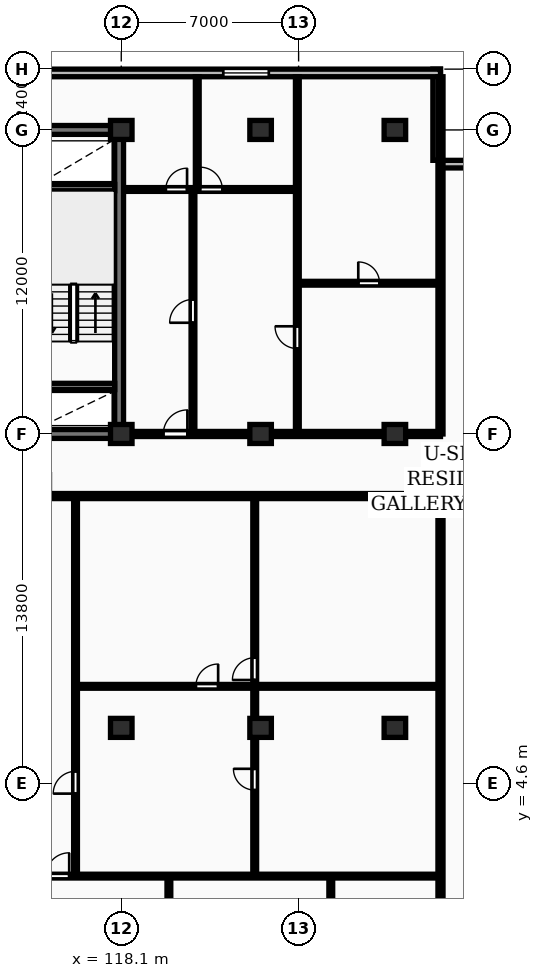
"""IFC4 building model, lengths in metres.
Left out: names, types, materials, properties, quantities, classifications, styles, units other than length and angle.
Written with IfcOpenShell. Run it as: python <this file> out.ifc"""

import sys

from ifc_helpers import new_model, si_unit, direction, frame, frame_2d, origin, origin_2d, place, context, subcontext, project, spatial, rectangle, extrude, element, fill, save


model = new_model("IFC4")
c1 = context("Model", 3, precision=1e-05, world=origin(), true_north=direction((0.0, 1.0)))
c2 = subcontext(c1, "Body", "Model", "MODEL_VIEW")
j1 = project(units=[si_unit("LENGTHUNIT", "METRE"), si_unit("PLANEANGLEUNIT", "RADIAN")], contexts=[c1])
p1 = place(None, origin())
s1 = spatial("IfcSite", under=j1, at=p1, CompositionType="ELEMENT")
p2 = place(p1, origin())
s2 = spatial("IfcBuilding", under=s1, at=p2, CompositionType="ELEMENT")
p3 = place(p2, frame((0.0, 0.0, 100.3)))
s3 = spatial("IfcBuildingStorey", under=s2, at=p3, CompositionType="ELEMENT", Elevation=100.3)
for number, where, z_axis, x_axis in (
    (1, (118.1, 6.8, 0.0), (0.0, 0.0, 1.0), (1.0, 0.0, 0.0)),
    (2, (118.1, 18.4, 0.0), (0.0, 0.0, 1.0), (1.0, 0.0, 0.0)),
    (3, (118.1, 30.4, 0.0), (0.0, 0.0, 1.0), (1.0, 0.0, 0.0)),
    (4, (123.6, 6.8, 0.0), (0.0, 0.0, 1.0), (1.0, 0.0, 0.0)),
    (5, (123.6, 18.4, 0.0), (0.0, 0.0, 1.0), (1.0, 0.0, 0.0)),
    (6, (123.6, 30.4, 0.0), (0.0, 0.0, 1.0), (1.0, 0.0, 0.0)),
    (7, (128.9, 6.8, 0.0), (0.0, 0.0, 1.0), (1.0, 0.0, 0.0)),
    (8, (128.9, 18.4, 0.0), (0.0, 0.0, 1.0), (1.0, 0.0, 0.0)),
    (9, (128.9, 30.4, 0.0), (0.0, 0.0, 1.0), (1.0, 0.0, 0.0)),
):
    element("IfcColumn", number, at=place(p3, frame(where, z_axis=z_axis, x_axis=x_axis)), inside=s3, PredefinedType="COLUMN", context=c2, shape_type="SweptSolid", body=[
        extrude(rectangle(XDim=0.85, YDim=0.75, at=origin_2d()), origin(), (0.0, 0.0, 1.0), 3.25),
    ])
for number, where, z_axis, x_axis in (
    (10, (134.3, 29.05, 0.0), (0.0, 0.0, 1.0), (-1.0, 0.0, 0.0)),
    (11, (130.55, 29.2, 0.0), (0.0, 0.0, 1.0), (0.0, 1.0, 0.0)),
):
    element("IfcWall", number, at=place(p3, frame(where, z_axis=z_axis, x_axis=x_axis)), inside=s3, PredefinedType="STANDARD", context=c2, shape_type="SweptSolid", body=[
        extrude(rectangle(XDim=3.6, YDim=0.3, at=frame_2d((1.8, 0.0))), origin(), (0.0, 0.0, 1.0), 2.97),
    ])
p4 = place(p3, frame((130.7, 32.65, 0.0), z_axis=(0.0, 0.0, 1.0), x_axis=(-1.0, 0.0, 0.0)))
e12 = element("IfcWall", 12, at=p4, inside=s3, PredefinedType="STANDARD", context=c2, shape_type="SweptSolid", body=[
    extrude(rectangle(XDim=58.0, YDim=0.3, at=frame_2d((29.0, 0.0))), origin(), (0.0, 0.0, 1.0), 2.97),
])
p5 = place(p4, frame((50.125, 0.0, 0.85)))
e13 = element("IfcOpeningElement", 13, at=p5, cuts=e12, PredefinedType="OPENING", context=c2, shape_type="SweptSolid", body=[
    extrude(rectangle(XDim=1.8, YDim=1.8, at=frame_2d((0.9, 0.9))), frame((0.0, 0.16, 0.0), z_axis=(0.0, -1.0, 0.0), x_axis=(1.0, 0.0, 0.0)), (0.0, 0.0, 1.0), 0.32),
])
p6 = place(p4, frame((6.775, 0.0, 0.85)))
e14 = element("IfcOpeningElement", 14, at=p6, cuts=e12, PredefinedType="OPENING", context=c2, shape_type="SweptSolid", body=[
    extrude(rectangle(XDim=1.8, YDim=1.8, at=frame_2d((0.9, 0.9))), frame((0.0, 0.16, 0.0), z_axis=(0.0, -1.0, 0.0), x_axis=(1.0, 0.0, 0.0)), (0.0, 0.0, 1.0), 0.32),
])
p7 = place(p3, frame((81.925, 30.4, 0.0), z_axis=(0.0, 0.0, 1.0), x_axis=(1.0, 0.0, 0.0)))
e15 = element("IfcWall", 15, at=p7, inside=s3, PredefinedType="SHEAR", context=c2, shape_type="SweptSolid", body=[
    extrude(rectangle(XDim=36.265, YDim=0.35, at=frame_2d((18.132, 0.0))), origin(), (0.0, 0.0, 1.0), 3.25),
])
p8 = place(p3, frame((118.015, 18.575, 0.0), z_axis=(0.0, 0.0, 1.0), x_axis=(0.0, 1.0, 0.0)))
e16 = element("IfcWall", 16, at=p8, inside=s3, PredefinedType="SHEAR", context=c2, shape_type="SweptSolid", body=[
    extrude(rectangle(XDim=11.65, YDim=0.35, at=frame_2d((5.825, 0.0))), origin(), (0.0, 0.0, 1.0), 3.25),
])
p9 = place(p3, frame((81.925, 18.4, 0.0), z_axis=(0.0, 0.0, 1.0), x_axis=(1.0, 0.0, 0.0)))
e17 = element("IfcWall", 17, at=p9, inside=s3, PredefinedType="SHEAR", context=c2, shape_type="SweptSolid", body=[
    extrude(rectangle(XDim=36.265, YDim=0.35, at=frame_2d((18.132, 0.0))), origin(), (0.0, 0.0, 1.0), 3.25),
])
p10 = place(p9, frame((5.675, 0.0, 0.0)))
e18 = element("IfcOpeningElement", 18, at=p10, cuts=e17, PredefinedType="OPENING", context=c2, shape_type="SweptSolid", body=[
    extrude(rectangle(XDim=1.0, YDim=2.15, at=frame_2d((0.5, 1.075))), frame((0.0, 0.185, 0.0), z_axis=(0.0, -1.0, 0.0), x_axis=(1.0, 0.0, 0.0)), (0.0, 0.0, 1.0), 0.37),
])
p11 = place(p9, frame((21.925, 0.0, 0.0)))
e19 = element("IfcOpeningElement", 19, at=p11, cuts=e17, PredefinedType="OPENING", context=c2, shape_type="SweptSolid", body=[
    extrude(rectangle(XDim=1.5, YDim=2.2, at=frame_2d((0.75, 1.1))), frame((0.0, 0.185, 0.0), z_axis=(0.0, -1.0, 0.0), x_axis=(1.0, 0.0, 0.0)), (0.0, 0.0, 1.0), 0.37),
])
p12 = place(p9, frame((29.875, 0.0, 0.0)))
e20 = element("IfcOpeningElement", 20, at=p12, cuts=e17, PredefinedType="OPENING", context=c2, shape_type="SweptSolid", body=[
    extrude(rectangle(XDim=1.0, YDim=2.15, at=frame_2d((0.5, 1.075))), frame((0.0, 0.185, 0.0), z_axis=(0.0, -1.0, 0.0), x_axis=(1.0, 0.0, 0.0)), (0.0, 0.0, 1.0), 0.37),
])
for number, where, z_axis, x_axis in (
    (21, (114.6, 20.275, 0.0), (0.0, 0.0, 1.0), (1.0, 0.0, 0.0)),
    (22, (114.6, 28.125, 0.0), (0.0, 0.0, 1.0), (1.0, 0.0, 0.0)),
):
    element("IfcWall", number, at=place(p3, frame(where, z_axis=z_axis, x_axis=x_axis)), inside=s3, PredefinedType="SHEAR", context=c2, shape_type="SweptSolid", body=[
        extrude(rectangle(XDim=3.24, YDim=0.25, at=frame_2d((1.62, 0.0))), origin(), (0.0, 0.0, 1.0), 3.25),
    ])
p13 = place(p3, frame((130.7, 18.4, 0.0), z_axis=(0.0, 0.0, 1.0), x_axis=(0.0, 1.0, 0.0)))
e23 = element("IfcWall", 23, at=p13, inside=s3, PredefinedType="PARTITIONING", context=c2, shape_type="SweptSolid", body=[
    extrude(rectangle(XDim=14.1, YDim=0.2, at=frame_2d((7.05, 0.0))), origin(), (0.0, 0.0, 1.0), 2.97),
])
p14 = place(p3, frame((125.05, 24.35, 0.0), z_axis=(0.0, 0.0, 1.0), x_axis=(1.0, 0.0, 0.0)))
e24 = element("IfcWall", 24, at=p14, inside=s3, PredefinedType="PARTITIONING", context=c2, shape_type="SweptSolid", body=[
    extrude(rectangle(XDim=5.65, YDim=0.15, at=frame_2d((2.825, 0.0))), origin(), (0.0, 0.0, 1.0), 2.97),
])
p15 = place(p14, frame((2.405, 0.0, 0.0)))
e25 = element("IfcOpeningElement", 25, at=p15, cuts=e24, PredefinedType="OPENING", context=c2, shape_type="SweptSolid", body=[
    extrude(rectangle(XDim=0.84, YDim=2.04, at=frame_2d((0.42, 1.02))), frame((0.0, 0.085, 0.0), z_axis=(0.0, -1.0, 0.0), x_axis=(1.0, 0.0, 0.0)), (0.0, 0.0, 1.0), 0.17),
])
p16 = place(p3, frame((125.05, 18.45, 0.0), z_axis=(0.0, 0.0, 1.0), x_axis=(0.0, 1.0, 0.0)))
e26 = element("IfcWall", 26, at=p16, inside=s3, PredefinedType="PARTITIONING", context=c2, shape_type="SweptSolid", body=[
    extrude(rectangle(XDim=14.05, YDim=0.15, at=frame_2d((7.025, 0.0))), origin(), (0.0, 0.0, 1.0), 2.97),
])
p17 = place(p16, frame((3.32, 0.0, 0.0)))
e27 = element("IfcOpeningElement", 27, at=p17, cuts=e26, PredefinedType="OPENING", context=c2, shape_type="SweptSolid", body=[
    extrude(rectangle(XDim=0.88, YDim=2.06, at=frame_2d((0.44, 1.03))), frame((0.0, 0.085, 0.0), z_axis=(0.0, -1.0, 0.0), x_axis=(1.0, 0.0, 0.0)), (0.0, 0.0, 1.0), 0.17),
])
p18 = place(p3, frame((120.93, 18.45, 0.0), z_axis=(0.0, 0.0, 1.0), x_axis=(0.0, 1.0, 0.0)))
e28 = element("IfcWall", 28, at=p18, inside=s3, PredefinedType="PARTITIONING", context=c2, shape_type="SweptSolid", body=[
    extrude(rectangle(XDim=9.6, YDim=0.15, at=frame_2d((4.8, 0.0))), origin(), (0.0, 0.0, 1.0), 2.97),
])
p19 = place(p18, frame((4.34, 0.0, 0.0)))
e29 = element("IfcOpeningElement", 29, at=p19, cuts=e28, PredefinedType="OPENING", context=c2, shape_type="SweptSolid", body=[
    extrude(rectangle(XDim=0.92, YDim=2.08, at=frame_2d((0.46, 1.04))), frame((0.0, 0.085, 0.0), z_axis=(0.0, -1.0, 0.0), x_axis=(1.0, 0.0, 0.0)), (0.0, 0.0, 1.0), 0.17),
])
p20 = place(p3, frame((121.1, 28.05, 0.0), z_axis=(0.0, 0.0, 1.0), x_axis=(0.0, 1.0, 0.0)))
e30 = element("IfcWall", 30, at=p20, inside=s3, PredefinedType="PARTITIONING", context=c2, shape_type="SweptSolid", body=[
    extrude(rectangle(XDim=4.45, YDim=0.15, at=frame_2d((2.225, 0.0))), origin(), (0.0, 0.0, 1.0), 2.97),
])
p21 = place(p3, frame((118.27, 28.05, 0.0), z_axis=(0.0, 0.0, 1.0), x_axis=(1.0, 0.0, 0.0)))
e31 = element("IfcWall", 31, at=p21, inside=s3, PredefinedType="PARTITIONING", context=c2, shape_type="SweptSolid", body=[
    extrude(rectangle(XDim=6.76, YDim=0.15, at=frame_2d((3.38, 0.0))), origin(), (0.0, 0.0, 1.0), 2.97),
])
p22 = place(p21, frame((1.587, 0.0, 0.0)))
e32 = element("IfcOpeningElement", 32, at=p22, cuts=e31, PredefinedType="OPENING", context=c2, shape_type="SweptSolid", body=[
    extrude(rectangle(XDim=0.84, YDim=2.04, at=frame_2d((0.42, 1.02))), frame((0.0, 0.085, 0.0), z_axis=(0.0, -1.0, 0.0), x_axis=(1.0, 0.0, 0.0)), (0.0, 0.0, 1.0), 0.17),
])
p23 = place(p21, frame((2.94, 0.0, 0.0)))
e33 = element("IfcOpeningElement", 33, at=p23, cuts=e31, PredefinedType="OPENING", context=c2, shape_type="SweptSolid", body=[
    extrude(rectangle(XDim=0.88, YDim=2.06, at=frame_2d((0.44, 1.03))), frame((0.0, 0.085, 0.0), z_axis=(0.0, -1.0, 0.0), x_axis=(1.0, 0.0, 0.0)), (0.0, 0.0, 1.0), 0.17),
])
p24 = place(p3, frame((118.25, 18.4, 0.0), z_axis=(0.0, 0.0, 1.0), x_axis=(1.0, 0.0, 0.0)))
e34 = element("IfcWall", 34, at=p24, inside=s3, PredefinedType="PARTITIONING", context=c2, shape_type="SweptSolid", body=[
    extrude(rectangle(XDim=12.45, YDim=0.2, at=frame_2d((6.225, 0.0))), origin(), (0.0, 0.0, 1.0), 2.358),
])
p25 = place(p24, frame((1.51, 0.0, 0.0)))
e35 = element("IfcOpeningElement", 35, at=p25, cuts=e34, PredefinedType="OPENING", context=c2, shape_type="SweptSolid", body=[
    extrude(rectangle(XDim=0.95, YDim=2.15, at=frame_2d((0.475, 1.075))), frame((0.0, 0.11, 0.0), z_axis=(0.0, -1.0, 0.0), x_axis=(1.0, 0.0, 0.0)), (0.0, 0.0, 1.0), 0.22),
])
p26 = place(p3, frame((130.7, -8.7, 0.0), z_axis=(0.0, 0.0, 1.0), x_axis=(0.0, 1.0, 0.0)))
e36 = element("IfcWall", 36, at=p26, inside=s3, PredefinedType="PARTITIONING", context=c2, shape_type="SweptSolid", body=[
    extrude(rectangle(XDim=24.57, YDim=0.2, at=frame_2d((12.285, 0.0))), origin(), (0.0, 0.0, 1.0), 2.97),
])
p27 = place(p3, frame((123.367, 0.99, 0.0), z_axis=(0.0, 0.0, 1.0), x_axis=(0.0, 1.0, 0.0)))
e37 = element("IfcWall", 37, at=p27, inside=s3, PredefinedType="PARTITIONING", context=c2, shape_type="SweptSolid", body=[
    extrude(rectangle(XDim=14.9, YDim=0.15, at=frame_2d((7.45, 0.0))), origin(), (0.0, 0.0, 1.0), 2.2),
])
p28 = place(p27, frame((3.355, 0.0, 0.0)))
e38 = element("IfcOpeningElement", 38, at=p28, cuts=e37, PredefinedType="OPENING", context=c2, shape_type="SweptSolid", body=[
    extrude(rectangle(XDim=0.84, YDim=2.04, at=frame_2d((0.42, 1.02))), frame((0.0, 0.085, 0.0), z_axis=(0.0, -1.0, 0.0), x_axis=(1.0, 0.0, 0.0)), (0.0, 0.0, 1.0), 0.17),
])
p29 = place(p27, frame((7.7, 0.0, 0.0)))
e39 = element("IfcOpeningElement", 39, at=p29, cuts=e37, PredefinedType="OPENING", context=c2, shape_type="SweptSolid", body=[
    extrude(rectangle(XDim=0.88, YDim=2.06, at=frame_2d((0.44, 1.03))), frame((0.0, 0.085, 0.0), z_axis=(0.0, -1.0, 0.0), x_axis=(1.0, 0.0, 0.0)), (0.0, 0.0, 1.0), 0.17),
])
p30 = place(p3, frame((116.355, 8.44, 0.0), z_axis=(0.0, 0.0, 1.0), x_axis=(1.0, 0.0, 0.0)))
e40 = element("IfcWall", 40, at=p30, inside=s3, PredefinedType="PARTITIONING", context=c2, shape_type="SweptSolid", body=[
    extrude(rectangle(XDim=14.265, YDim=0.15, at=frame_2d((7.133, 0.0))), origin(), (0.0, 0.0, 1.0), 2.97),
])
p31 = place(p30, frame((4.689, 0.0, 0.0)))
e41 = element("IfcOpeningElement", 41, at=p31, cuts=e40, PredefinedType="OPENING", context=c2, shape_type="SweptSolid", body=[
    extrude(rectangle(XDim=0.88, YDim=2.06, at=frame_2d((0.44, 1.03))), frame((0.0, 0.085, 0.0), z_axis=(0.0, -1.0, 0.0), x_axis=(1.0, 0.0, 0.0)), (0.0, 0.0, 1.0), 0.17),
])
p32 = place(p3, frame((116.295, 0.99, 0.0), z_axis=(0.0, 0.0, 1.0), x_axis=(0.0, 1.0, 0.0)))
e42 = element("IfcWall", 42, at=p32, inside=s3, PredefinedType="PARTITIONING", context=c2, shape_type="SweptSolid", body=[
    extrude(rectangle(XDim=14.9, YDim=0.15, at=frame_2d((7.45, 0.0))), origin(), (0.0, 0.0, 1.0), 2.97),
])
p33 = place(p32, frame((3.216, 0.0, 0.0)))
e43 = element("IfcOpeningElement", 43, at=p33, cuts=e42, PredefinedType="OPENING", context=c2, shape_type="SweptSolid", body=[
    extrude(rectangle(XDim=0.88, YDim=2.06, at=frame_2d((0.44, 1.03))), frame((0.0, 0.085, 0.0), z_axis=(0.0, -1.0, 0.0), x_axis=(1.0, 0.0, 0.0)), (0.0, 0.0, 1.0), 0.17),
])
p34 = place(p3, frame((119.98, -8.7, 0.0), z_axis=(0.0, 0.0, 1.0), x_axis=(0.0, 1.0, 0.0)))
e44 = element("IfcWall", 44, at=p34, inside=s3, PredefinedType="PARTITIONING", context=c2, shape_type="SweptSolid", body=[
    extrude(rectangle(XDim=9.61, YDim=0.15, at=frame_2d((4.805, 0.0))), origin(), (0.0, 0.0, 1.0), 2.97),
])
p35 = place(p34, frame((5.81, 0.0, 0.0)))
e45 = element("IfcOpeningElement", 45, at=p35, cuts=e44, PredefinedType="OPENING", context=c2, shape_type="SweptSolid", body=[
    extrude(rectangle(XDim=0.92, YDim=2.08, at=frame_2d((0.46, 1.04))), frame((0.0, 0.085, 0.0), z_axis=(0.0, -1.0, 0.0), x_axis=(1.0, 0.0, 0.0)), (0.0, 0.0, 1.0), 0.17),
])
p36 = place(p3, frame((126.37, -1.67, 0.0), z_axis=(0.0, 0.0, 1.0), x_axis=(0.0, 1.0, 0.0)))
e46 = element("IfcWall", 46, at=p36, inside=s3, PredefinedType="PARTITIONING", context=c2, shape_type="SweptSolid", body=[
    extrude(rectangle(XDim=2.58, YDim=0.15, at=frame_2d((1.29, 0.0))), origin(), (0.0, 0.0, 1.0), 2.97),
])
p37 = place(p3, frame((112.405, 0.95, 0.0), z_axis=(0.0, 0.0, 1.0), x_axis=(1.0, 0.0, 0.0)))
e47 = element("IfcWall", 47, at=p37, inside=s3, PredefinedType="PARTITIONING", context=c2, shape_type="SweptSolid", body=[
    extrude(rectangle(XDim=18.215, YDim=0.15, at=frame_2d((9.107, 0.0))), origin(), (0.0, 0.0, 1.0), 2.97),
])
p38 = place(p37, frame((2.72, 0.0, 0.0)))
e48 = element("IfcOpeningElement", 48, at=p38, cuts=e47, PredefinedType="OPENING", context=c2, shape_type="SweptSolid", body=[
    extrude(rectangle(XDim=0.92, YDim=2.08, at=frame_2d((0.46, 1.04))), frame((0.0, 0.085, 0.0), z_axis=(0.0, -1.0, 0.0), x_axis=(1.0, 0.0, 0.0)), (0.0, 0.0, 1.0), 0.17),
])
p39 = place(p3, frame((72.7, 15.95, 0.0), z_axis=(0.0, 0.0, 1.0), x_axis=(1.0, 0.0, 0.0)))
e49 = element("IfcWall", 49, at=p39, inside=s3, PredefinedType="PARTITIONING", context=c2, shape_type="SweptSolid", body=[
    extrude(rectangle(XDim=58.0, YDim=0.2, at=frame_2d((29.0, 0.0))), origin(), (0.0, 0.0, 1.0), 2.97),
])
p40 = place(p39, frame((6.539, 0.0, 0.0)))
e50 = element("IfcOpeningElement", 50, at=p40, cuts=e49, PredefinedType="OPENING", context=c2, shape_type="SweptSolid", body=[
    extrude(rectangle(XDim=1.22, YDim=2.18, at=frame_2d((0.61, 1.09))), frame((0.0, 0.11, 0.0), z_axis=(0.0, -1.0, 0.0), x_axis=(1.0, 0.0, 0.0)), (0.0, 0.0, 1.0), 0.22),
])
p41 = place(p39, frame((20.795, 0.0, 0.0)))
e51 = element("IfcOpeningElement", 51, at=p41, cuts=e49, PredefinedType="OPENING", context=c2, shape_type="SweptSolid", body=[
    extrude(rectangle(XDim=0.95, YDim=2.15, at=frame_2d((0.475, 1.075))), frame((0.0, 0.11, 0.0), z_axis=(0.0, -1.0, 0.0), x_axis=(1.0, 0.0, 0.0)), (0.0, 0.0, 1.0), 0.22),
])
p42 = place(p39, frame((30.92, 0.0, 0.0)))
e52 = element("IfcOpeningElement", 52, at=p42, cuts=e49, PredefinedType="OPENING", context=c2, shape_type="SweptSolid", body=[
    extrude(rectangle(XDim=0.95, YDim=2.15, at=frame_2d((0.475, 1.075))), frame((0.0, 0.11, 0.0), z_axis=(0.0, -1.0, 0.0), x_axis=(1.0, 0.0, 0.0)), (0.0, 0.0, 1.0), 0.22),
])
p43 = place(p39, frame((41.67, 0.0, 0.0)))
e53 = element("IfcOpeningElement", 53, at=p43, cuts=e49, PredefinedType="OPENING", context=c2, shape_type="SweptSolid", body=[
    extrude(rectangle(XDim=0.95, YDim=2.15, at=frame_2d((0.475, 1.075))), frame((0.0, 0.11, 0.0), z_axis=(0.0, -1.0, 0.0), x_axis=(1.0, 0.0, 0.0)), (0.0, 0.0, 1.0), 0.22),
])
p44 = place(p6, origin())
e54 = element("IfcWindow", 54, at=p44, inside=s3, PartitioningType="SINGLE_PANEL", PredefinedType="WINDOW", context=c2, shape_type="SweptSolid", body=[
    extrude(rectangle(XDim=1.8, YDim=1.8, at=frame_2d((0.9, 0.9))), frame((0.0, 0.03, 0.0), z_axis=(0.0, -1.0, 0.0), x_axis=(1.0, 0.0, 0.0)), (0.0, 0.0, 1.0), 0.06),
])
fill(e14, e54)
p45 = place(p15, origin())
e55 = element("IfcDoor", 55, at=p45, inside=s3, OperationType="SINGLE_SWING_LEFT", PredefinedType="DOOR", context=c2, shape_type="SweptSolid", body=[
    extrude(rectangle(XDim=0.84, YDim=2.04, at=frame_2d((0.42, 1.02))), frame((0.0, 0.025, 0.0), z_axis=(0.0, -1.0, 0.0), x_axis=(1.0, 0.0, 0.0)), (0.0, 0.0, 1.0), 0.05),
])
fill(e25, e55)
p46 = place(p17, origin())
e56 = element("IfcDoor", 56, at=p46, inside=s3, OperationType="SINGLE_SWING_RIGHT", PredefinedType="DOOR", context=c2, shape_type="SweptSolid", body=[
    extrude(rectangle(XDim=0.88, YDim=2.06, at=frame_2d((0.44, 1.03))), frame((0.0, 0.025, 0.0), z_axis=(0.0, -1.0, 0.0), x_axis=(1.0, 0.0, 0.0)), (0.0, 0.0, 1.0), 0.05),
])
fill(e27, e56)
p47 = place(p19, origin())
e57 = element("IfcDoor", 57, at=p47, inside=s3, OperationType="SINGLE_SWING_LEFT", PredefinedType="DOOR", context=c2, shape_type="SweptSolid", body=[
    extrude(rectangle(XDim=0.92, YDim=2.08, at=frame_2d((0.46, 1.04))), frame((0.0, 0.025, 0.0), z_axis=(0.0, -1.0, 0.0), x_axis=(1.0, 0.0, 0.0)), (0.0, 0.0, 1.0), 0.05),
])
fill(e29, e57)
p48 = place(p22, origin())
e58 = element("IfcDoor", 58, at=p48, inside=s3, OperationType="SINGLE_SWING_RIGHT", PredefinedType="DOOR", context=c2, shape_type="SweptSolid", body=[
    extrude(rectangle(XDim=0.84, YDim=2.04, at=frame_2d((0.42, 1.02))), frame((0.0, 0.025, 0.0), z_axis=(0.0, -1.0, 0.0), x_axis=(1.0, 0.0, 0.0)), (0.0, 0.0, 1.0), 0.05),
])
fill(e32, e58)
p49 = place(p23, origin())
e59 = element("IfcDoor", 59, at=p49, inside=s3, OperationType="SINGLE_SWING_LEFT", PredefinedType="DOOR", context=c2, shape_type="SweptSolid", body=[
    extrude(rectangle(XDim=0.88, YDim=2.06, at=frame_2d((0.44, 1.03))), frame((0.0, 0.025, 0.0), z_axis=(0.0, -1.0, 0.0), x_axis=(1.0, 0.0, 0.0)), (0.0, 0.0, 1.0), 0.05),
])
fill(e33, e59)
p50 = place(p25, origin())
e60 = element("IfcDoor", 60, at=p50, inside=s3, OperationType="SINGLE_SWING_RIGHT", PredefinedType="DOOR", context=c2, shape_type="SweptSolid", body=[
    extrude(rectangle(XDim=0.95, YDim=2.15, at=frame_2d((0.475, 1.075))), frame((0.0, 0.025, 0.0), z_axis=(0.0, -1.0, 0.0), x_axis=(1.0, 0.0, 0.0)), (0.0, 0.0, 1.0), 0.05),
])
fill(e35, e60)
p51 = place(p28, origin())
e61 = element("IfcDoor", 61, at=p51, inside=s3, OperationType="SINGLE_SWING_RIGHT", PredefinedType="DOOR", context=c2, shape_type="SweptSolid", body=[
    extrude(rectangle(XDim=0.84, YDim=2.04, at=frame_2d((0.42, 1.02))), frame((0.0, 0.025, 0.0), z_axis=(0.0, -1.0, 0.0), x_axis=(1.0, 0.0, 0.0)), (0.0, 0.0, 1.0), 0.05),
])
fill(e38, e61)
p52 = place(p29, origin())
e62 = element("IfcDoor", 62, at=p52, inside=s3, OperationType="SINGLE_SWING_LEFT", PredefinedType="DOOR", context=c2, shape_type="SweptSolid", body=[
    extrude(rectangle(XDim=0.88, YDim=2.06, at=frame_2d((0.44, 1.03))), frame((0.0, 0.025, 0.0), z_axis=(0.0, -1.0, 0.0), x_axis=(1.0, 0.0, 0.0)), (0.0, 0.0, 1.0), 0.05),
])
fill(e39, e62)
p53 = place(p31, origin())
e63 = element("IfcDoor", 63, at=p53, inside=s3, OperationType="SINGLE_SWING_RIGHT", PredefinedType="DOOR", context=c2, shape_type="SweptSolid", body=[
    extrude(rectangle(XDim=0.88, YDim=2.06, at=frame_2d((0.44, 1.03))), frame((0.0, 0.025, 0.0), z_axis=(0.0, -1.0, 0.0), x_axis=(1.0, 0.0, 0.0)), (0.0, 0.0, 1.0), 0.05),
])
fill(e41, e63)
p54 = place(p33, origin())
e64 = element("IfcDoor", 64, at=p54, inside=s3, OperationType="SINGLE_SWING_LEFT", PredefinedType="DOOR", context=c2, shape_type="SweptSolid", body=[
    extrude(rectangle(XDim=0.88, YDim=2.06, at=frame_2d((0.44, 1.03))), frame((0.0, 0.025, 0.0), z_axis=(0.0, -1.0, 0.0), x_axis=(1.0, 0.0, 0.0)), (0.0, 0.0, 1.0), 0.05),
])
fill(e43, e64)
p55 = place(p38, origin())
e65 = element("IfcDoor", 65, at=p55, inside=s3, OperationType="SINGLE_SWING_RIGHT", PredefinedType="DOOR", context=c2, shape_type="SweptSolid", body=[
    extrude(rectangle(XDim=0.92, YDim=2.08, at=frame_2d((0.46, 1.04))), frame((0.0, 0.025, 0.0), z_axis=(0.0, -1.0, 0.0), x_axis=(1.0, 0.0, 0.0)), (0.0, 0.0, 1.0), 0.05),
])
fill(e48, e65)
save(model, sys.argv[1])
